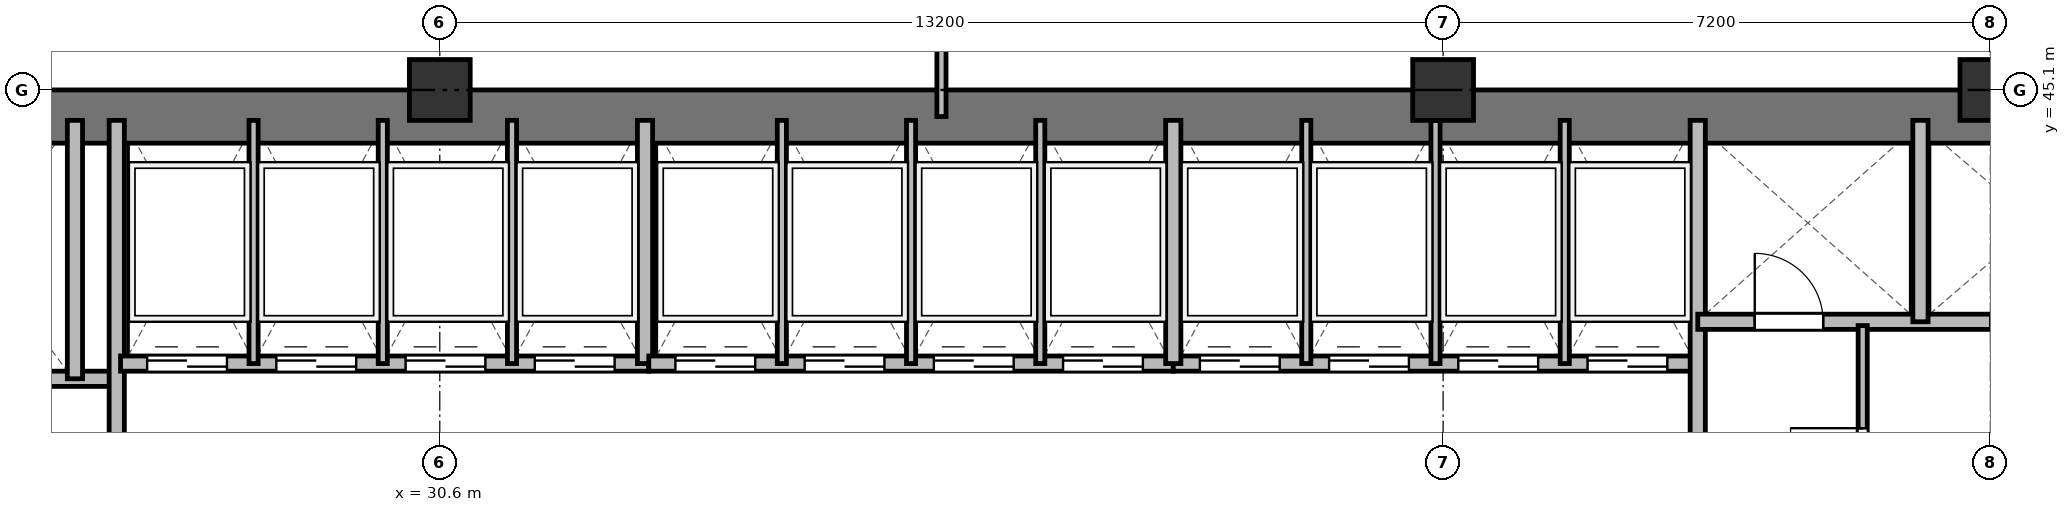
"""IFC4 building model, lengths in metres.
Left out: names, types, materials, properties, quantities, classifications, styles, units other than length and angle.
Written with IfcOpenShell. Run it as: python <this file> out.ifc"""

import sys

from ifc_helpers import new_model, si_unit, direction, frame, frame_2d, origin, origin_2d, place, context, subcontext, project, spatial, rectangle, extrude, source, transform, mapped, element, fill, save


model = new_model("IFC4")
c1 = context("Model", 3, precision=1e-05, world=origin(), true_north=direction((0.0, 1.0)))
c2 = subcontext(c1, "Body", "Model", "MODEL_VIEW")
j1 = project(units=[si_unit("LENGTHUNIT", "METRE"), si_unit("PLANEANGLEUNIT", "RADIAN")], contexts=[c1])
p1 = place(None, origin())
s1 = spatial("IfcSite", under=j1, at=p1, CompositionType="ELEMENT")
p2 = place(p1, origin())
s2 = spatial("IfcBuilding", under=s1, at=p2, CompositionType="ELEMENT")
p3 = place(p2, frame((0.0, 0.0, 128.5)))
s3 = spatial("IfcBuildingStorey", under=s2, at=p3, CompositionType="ELEMENT", Elevation=128.5)
m1 = source(origin(), c2, "Body", "SweptSolid", [
    extrude(rectangle(XDim=0.8, YDim=0.8, at=origin_2d()), origin(), (0.0, 0.0, 1.0), 3.6),
])
for number, where, z_axis, x_axis in (
    (1, (30.6, 45.1, 0.0), (0.0, 0.0, 1.0), (1.0, 0.0, 0.0)),
    (2, (43.8, 45.1, 0.0), (0.0, 0.0, 1.0), (1.0, 0.0, 0.0)),
    (3, (51.0, 45.1, 0.0), (0.0, 0.0, 1.0), (1.0, 0.0, 0.0)),
):
    element("IfcColumn", number, at=place(p3, frame(where, z_axis=z_axis, x_axis=x_axis)), inside=s3, PredefinedType="COLUMN", context=c2, shape_type="MappedRepresentation", body=[
        mapped(m1, transform((0.0, 0.0, 0.0), x_axis=(1.0, 0.0, 0.0), y_axis=(0.0, 1.0, 0.0), z_axis=(0.0, 0.0, 1.0), scale=1.0)),
    ])
p4 = place(p3, frame((15.5, 44.75, 0.0), z_axis=(0.0, 0.0, 1.0), x_axis=(1.0, 0.0, 0.0)))
e4 = element("IfcWall", 4, at=p4, inside=s3, PredefinedType="SHEAR", context=c2, shape_type="SweptSolid", body=[
    extrude(rectangle(XDim=43.4, YDim=0.7, at=frame_2d((21.7, 0.0))), origin(), (0.0, 0.0, 1.0), 3.22),
])
p5 = place(p3, frame((19.55, 41.3, 0.0), z_axis=(0.0, 0.0, 1.0), x_axis=(1.0, 0.0, 0.0)))
e5 = element("IfcWall", 5, at=p5, inside=s3, PredefinedType="SOLIDWALL", context=c2, shape_type="SweptSolid", body=[
    extrude(rectangle(XDim=6.75, YDim=0.2, at=frame_2d((3.375, 0.0))), origin(), (0.0, 0.0, 1.0), 3.22),
])
p6 = place(p5, frame((1.7, 0.0, 0.0)))
e6 = element("IfcOpeningElement", 6, at=p6, cuts=e5, PredefinedType="OPENING", context=c2, shape_type="SweptSolid", body=[
    extrude(rectangle(XDim=1.1, YDim=2.15, at=frame_2d((0.55, 1.075))), frame((0.0, 0.11, 0.0), z_axis=(0.0, -1.0, 0.0), x_axis=(1.0, 0.0, 0.0)), (0.0, 0.0, 1.0), 0.22),
])
p7 = place(p5, frame((4.4, 0.0, 0.0)))
e7 = element("IfcOpeningElement", 7, at=p7, cuts=e5, PredefinedType="OPENING", context=c2, shape_type="SweptSolid", body=[
    extrude(rectangle(XDim=1.1, YDim=2.15, at=frame_2d((0.55, 1.075))), frame((0.0, 0.11, 0.0), z_axis=(0.0, -1.0, 0.0), x_axis=(1.0, 0.0, 0.0)), (0.0, 0.0, 1.0), 0.22),
])
p8 = place(p3, frame((25.8, 41.3, 0.0), z_axis=(0.0, 0.0, 1.0), x_axis=(0.0, 1.0, 0.0)))
e8 = element("IfcWall", 8, at=p8, inside=s3, PredefinedType="SOLIDWALL", context=c2, shape_type="SweptSolid", body=[
    extrude(rectangle(XDim=3.4, YDim=0.2, at=frame_2d((1.7, 0.0))), origin(), (0.0, 0.0, 1.0), 3.22),
])
p9 = place(p3, frame((26.35, 33.4, 0.0), z_axis=(0.0, 0.0, 1.0), x_axis=(0.0, 1.0, 0.0)))
e9 = element("IfcWall", 9, at=p9, inside=s3, PredefinedType="SOLIDWALL", context=c2, shape_type="SweptSolid", body=[
    extrude(rectangle(XDim=11.3, YDim=0.2, at=frame_2d((5.65, 0.0))), origin(), (0.0, 0.0, 1.0), 2.632),
])
p10 = place(p3, frame((26.4, 41.5, 0.0), z_axis=(0.0, 0.0, 1.0), x_axis=(1.0, 0.0, 0.0)))
e10 = element("IfcWall", 10, at=p10, inside=s3, PredefinedType="SOLIDWALL", context=c2, shape_type="SweptSolid", body=[
    extrude(rectangle(XDim=6.95, YDim=0.2, at=frame_2d((3.475, 0.0))), origin(), (0.0, 0.0, 1.0), 3.22),
])
p11 = place(p10, frame((0.35, 0.0, 0.0)))
e11 = element("IfcOpeningElement", 11, at=p11, cuts=e10, PredefinedType="OPENING", context=c2, shape_type="SweptSolid", body=[
    extrude(rectangle(XDim=1.05, YDim=2.15, at=frame_2d((0.525, 1.075))), frame((0.0, 0.11, 0.0), z_axis=(0.0, -1.0, 0.0), x_axis=(1.0, 0.0, 0.0)), (0.0, 0.0, 1.0), 0.22),
])
p12 = place(p10, frame((2.05, 0.0, 0.0)))
e12 = element("IfcOpeningElement", 12, at=p12, cuts=e10, PredefinedType="OPENING", context=c2, shape_type="SweptSolid", body=[
    extrude(rectangle(XDim=1.05, YDim=2.15, at=frame_2d((0.525, 1.075))), frame((0.0, 0.11, 0.0), z_axis=(0.0, -1.0, 0.0), x_axis=(1.0, 0.0, 0.0)), (0.0, 0.0, 1.0), 0.22),
])
p13 = place(p10, frame((3.75, 0.0, 0.0)))
e13 = element("IfcOpeningElement", 13, at=p13, cuts=e10, PredefinedType="OPENING", context=c2, shape_type="SweptSolid", body=[
    extrude(rectangle(XDim=1.05, YDim=2.15, at=frame_2d((0.525, 1.075))), frame((0.0, 0.11, 0.0), z_axis=(0.0, -1.0, 0.0), x_axis=(1.0, 0.0, 0.0)), (0.0, 0.0, 1.0), 0.22),
])
p14 = place(p10, frame((5.45, 0.0, 0.0)))
e14 = element("IfcOpeningElement", 14, at=p14, cuts=e10, PredefinedType="OPENING", context=c2, shape_type="SweptSolid", body=[
    extrude(rectangle(XDim=1.05, YDim=2.15, at=frame_2d((0.525, 1.075))), frame((0.0, 0.11, 0.0), z_axis=(0.0, -1.0, 0.0), x_axis=(1.0, 0.0, 0.0)), (0.0, 0.0, 1.0), 0.22),
])
p15 = place(p3, frame((33.3, 41.5, 0.0), z_axis=(0.0, 0.0, 1.0), x_axis=(0.0, 1.0, 0.0)))
e15 = element("IfcWall", 15, at=p15, inside=s3, PredefinedType="SOLIDWALL", context=c2, shape_type="SweptSolid", body=[
    extrude(rectangle(XDim=3.2, YDim=0.2, at=frame_2d((1.6, 0.0))), origin(), (0.0, 0.0, 1.0), 3.22),
])
for number, where, z_axis, x_axis in (
    (16, (28.15, 41.5, 0.0), (0.0, 0.0, 1.0), (0.0, 1.0, 0.0)),
    (17, (29.85, 41.5, 0.0), (0.0, 0.0, 1.0), (0.0, 1.0, 0.0)),
    (18, (31.55, 41.5, 0.0), (0.0, 0.0, 1.0), (0.0, 1.0, 0.0)),
):
    element("IfcWall", number, at=place(p3, frame(where, z_axis=z_axis, x_axis=x_axis)), inside=s3, PredefinedType="PARTITIONING", context=c2, shape_type="SweptSolid", body=[
        extrude(rectangle(XDim=3.2, YDim=0.12, at=frame_2d((1.6, 0.0))), origin(), (0.0, 0.0, 1.0), 3.22),
    ])
p16 = place(p3, frame((33.35, 41.5, 0.0), z_axis=(0.0, 0.0, 1.0), x_axis=(1.0, 0.0, 0.0)))
e19 = element("IfcWall", 19, at=p16, inside=s3, PredefinedType="SOLIDWALL", context=c2, shape_type="SweptSolid", body=[
    extrude(rectangle(XDim=6.9, YDim=0.2, at=frame_2d((3.45, 0.0))), origin(), (0.0, 0.0, 1.0), 3.22),
])
p17 = place(p16, frame((0.35, 0.0, 0.0)))
e20 = element("IfcOpeningElement", 20, at=p17, cuts=e19, PredefinedType="OPENING", context=c2, shape_type="SweptSolid", body=[
    extrude(rectangle(XDim=1.05, YDim=2.15, at=frame_2d((0.525, 1.075))), frame((0.0, 0.11, 0.0), z_axis=(0.0, -1.0, 0.0), x_axis=(1.0, 0.0, 0.0)), (0.0, 0.0, 1.0), 0.22),
])
p18 = place(p16, frame((2.05, 0.0, 0.0)))
e21 = element("IfcOpeningElement", 21, at=p18, cuts=e19, PredefinedType="OPENING", context=c2, shape_type="SweptSolid", body=[
    extrude(rectangle(XDim=1.05, YDim=2.15, at=frame_2d((0.525, 1.075))), frame((0.0, 0.11, 0.0), z_axis=(0.0, -1.0, 0.0), x_axis=(1.0, 0.0, 0.0)), (0.0, 0.0, 1.0), 0.22),
])
p19 = place(p16, frame((3.75, 0.0, 0.0)))
e22 = element("IfcOpeningElement", 22, at=p19, cuts=e19, PredefinedType="OPENING", context=c2, shape_type="SweptSolid", body=[
    extrude(rectangle(XDim=1.05, YDim=2.15, at=frame_2d((0.525, 1.075))), frame((0.0, 0.11, 0.0), z_axis=(0.0, -1.0, 0.0), x_axis=(1.0, 0.0, 0.0)), (0.0, 0.0, 1.0), 0.22),
])
p20 = place(p16, frame((5.45, 0.0, 0.0)))
e23 = element("IfcOpeningElement", 23, at=p20, cuts=e19, PredefinedType="OPENING", context=c2, shape_type="SweptSolid", body=[
    extrude(rectangle(XDim=1.05, YDim=2.15, at=frame_2d((0.525, 1.075))), frame((0.0, 0.11, 0.0), z_axis=(0.0, -1.0, 0.0), x_axis=(1.0, 0.0, 0.0)), (0.0, 0.0, 1.0), 0.22),
])
for number, where, z_axis, x_axis in (
    (24, (35.1, 41.5, 0.0), (0.0, 0.0, 1.0), (0.0, 1.0, 0.0)),
    (25, (36.8, 41.5, 0.0), (0.0, 0.0, 1.0), (0.0, 1.0, 0.0)),
    (26, (38.5, 41.5, 0.0), (0.0, 0.0, 1.0), (0.0, 1.0, 0.0)),
):
    element("IfcWall", number, at=place(p3, frame(where, z_axis=z_axis, x_axis=x_axis)), inside=s3, PredefinedType="PARTITIONING", context=c2, shape_type="SweptSolid", body=[
        extrude(rectangle(XDim=3.2, YDim=0.12, at=frame_2d((1.6, 0.0))), origin(), (0.0, 0.0, 1.0), 3.22),
    ])
p21 = place(p3, frame((40.25, 41.5, 0.0), z_axis=(0.0, 0.0, 1.0), x_axis=(1.0, 0.0, 0.0)))
e27 = element("IfcWall", 27, at=p21, inside=s3, PredefinedType="SOLIDWALL", context=c2, shape_type="SweptSolid", body=[
    extrude(rectangle(XDim=6.9, YDim=0.2, at=frame_2d((3.45, 0.0))), origin(), (0.0, 0.0, 1.0), 2.72),
])
p22 = place(p21, frame((0.35, 0.0, 0.0)))
e28 = element("IfcOpeningElement", 28, at=p22, cuts=e27, PredefinedType="OPENING", context=c2, shape_type="SweptSolid", body=[
    extrude(rectangle(XDim=1.05, YDim=2.15, at=frame_2d((0.525, 1.075))), frame((0.0, 0.11, 0.0), z_axis=(0.0, -1.0, 0.0), x_axis=(1.0, 0.0, 0.0)), (0.0, 0.0, 1.0), 0.22),
])
p23 = place(p21, frame((2.05, 0.0, 0.0)))
e29 = element("IfcOpeningElement", 29, at=p23, cuts=e27, PredefinedType="OPENING", context=c2, shape_type="SweptSolid", body=[
    extrude(rectangle(XDim=1.05, YDim=2.15, at=frame_2d((0.525, 1.075))), frame((0.0, 0.11, 0.0), z_axis=(0.0, -1.0, 0.0), x_axis=(1.0, 0.0, 0.0)), (0.0, 0.0, 1.0), 0.22),
])
p24 = place(p21, frame((3.75, 0.0, 0.0)))
e30 = element("IfcOpeningElement", 30, at=p24, cuts=e27, PredefinedType="OPENING", context=c2, shape_type="SweptSolid", body=[
    extrude(rectangle(XDim=1.05, YDim=2.15, at=frame_2d((0.525, 1.075))), frame((0.0, 0.11, 0.0), z_axis=(0.0, -1.0, 0.0), x_axis=(1.0, 0.0, 0.0)), (0.0, 0.0, 1.0), 0.22),
])
p25 = place(p21, frame((5.45, 0.0, 0.0)))
e31 = element("IfcOpeningElement", 31, at=p25, cuts=e27, PredefinedType="OPENING", context=c2, shape_type="SweptSolid", body=[
    extrude(rectangle(XDim=1.05, YDim=2.15, at=frame_2d((0.525, 1.075))), frame((0.0, 0.11, 0.0), z_axis=(0.0, -1.0, 0.0), x_axis=(1.0, 0.0, 0.0)), (0.0, 0.0, 1.0), 0.22),
])
p26 = place(p3, frame((40.25, 41.5, 0.0), z_axis=(0.0, 0.0, 1.0), x_axis=(0.0, 1.0, 0.0)))
e32 = element("IfcWall", 32, at=p26, inside=s3, PredefinedType="SOLIDWALL", context=c2, shape_type="SweptSolid", body=[
    extrude(rectangle(XDim=3.2, YDim=0.2, at=frame_2d((1.6, 0.0))), origin(), (0.0, 0.0, 1.0), 3.22),
])
p27 = place(p3, frame((42.0, 41.5, 0.0), z_axis=(0.0, 0.0, 1.0), x_axis=(0.0, 1.0, 0.0)))
e33 = element("IfcWall", 33, at=p27, inside=s3, PredefinedType="PARTITIONING", context=c2, shape_type="SweptSolid", body=[
    extrude(rectangle(XDim=3.2, YDim=0.12, at=frame_2d((1.6, 0.0))), origin(), (0.0, 0.0, 1.0), 3.22),
])
p28 = place(p3, frame((43.7, 41.5, 0.0), z_axis=(0.0, 0.0, 1.0), x_axis=(0.0, 1.0, 0.0)))
e34 = element("IfcWall", 34, at=p28, inside=s3, PredefinedType="PARTITIONING", context=c2, shape_type="SweptSolid", body=[
    extrude(rectangle(XDim=3.2, YDim=0.12, at=frame_2d((1.6, 0.0))), origin(), (0.0, 0.0, 1.0), 2.72),
])
p29 = place(p3, frame((45.4, 41.5, 0.0), z_axis=(0.0, 0.0, 1.0), x_axis=(0.0, 1.0, 0.0)))
e35 = element("IfcWall", 35, at=p29, inside=s3, PredefinedType="PARTITIONING", context=c2, shape_type="SweptSolid", body=[
    extrude(rectangle(XDim=3.2, YDim=0.12, at=frame_2d((1.6, 0.0))), origin(), (0.0, 0.0, 1.0), 3.22),
])
p30 = place(p3, frame((47.15, 33.4, 0.0), z_axis=(0.0, 0.0, 1.0), x_axis=(0.0, 1.0, 0.0)))
e36 = element("IfcWall", 36, at=p30, inside=s3, PredefinedType="SOLIDWALL", context=c2, shape_type="SweptSolid", body=[
    extrude(rectangle(XDim=11.3, YDim=0.2, at=frame_2d((5.65, 0.0))), origin(), (0.0, 0.0, 1.0), 2.632),
])
p31 = place(p3, frame((47.15, 42.05, 0.0), z_axis=(0.0, 0.0, 1.0), x_axis=(1.0, 0.0, 0.0)))
e37 = element("IfcWall", 37, at=p31, inside=s3, PredefinedType="SOLIDWALL", context=c2, shape_type="SweptSolid", body=[
    extrude(rectangle(XDim=7.85, YDim=0.2, at=frame_2d((3.925, 0.0))), origin(), (0.0, 0.0, 1.0), 2.72),
])
p32 = place(p31, frame((0.75, 0.0, 0.0)))
e38 = element("IfcOpeningElement", 38, at=p32, cuts=e37, PredefinedType="OPENING", context=c2, shape_type="SweptSolid", body=[
    extrude(rectangle(XDim=0.9, YDim=2.1, at=frame_2d((0.45, 1.05))), frame((0.0, 0.11, 0.0), z_axis=(0.0, -1.0, 0.0), x_axis=(1.0, 0.0, 0.0)), (0.0, 0.0, 1.0), 0.22),
])
p33 = place(p31, frame((3.85, 0.0, 0.0)))
e39 = element("IfcOpeningElement", 39, at=p33, cuts=e37, PredefinedType="OPENING", context=c2, shape_type="SweptSolid", body=[
    extrude(rectangle(XDim=0.9, YDim=2.1, at=frame_2d((0.45, 1.05))), frame((0.0, 0.11, 0.0), z_axis=(0.0, -1.0, 0.0), x_axis=(1.0, 0.0, 0.0)), (0.0, 0.0, 1.0), 0.22),
])
p34 = place(p3, frame((50.08, 42.05, 0.0), z_axis=(0.0, 0.0, 1.0), x_axis=(0.0, 1.0, 0.0)))
e40 = element("IfcWall", 40, at=p34, inside=s3, PredefinedType="SOLIDWALL", context=c2, shape_type="SweptSolid", body=[
    extrude(rectangle(XDim=2.65, YDim=0.2, at=frame_2d((1.325, 0.0))), origin(), (0.0, 0.0, 1.0), 3.22),
])
p35 = place(p3, frame((49.32, 33.4, 0.0), z_axis=(0.0, 0.0, 1.0), x_axis=(0.0, 1.0, 0.0)))
e41 = element("IfcWall", 41, at=p35, inside=s3, PredefinedType="PARTITIONING", context=c2, shape_type="SweptSolid", body=[
    extrude(rectangle(XDim=8.6, YDim=0.12, at=frame_2d((4.3, 0.0))), origin(), (0.0, 0.0, 1.0), 2.632),
])
p36 = place(p35, frame((0.85, 0.0, 0.0)))
e42 = element("IfcOpeningElement", 42, at=p36, cuts=e41, PredefinedType="OPENING", context=c2, shape_type="SweptSolid", body=[
    extrude(rectangle(XDim=0.95, YDim=2.15, at=frame_2d((0.475, 1.075))), frame((0.0, 0.07, 0.0), z_axis=(0.0, -1.0, 0.0), x_axis=(1.0, 0.0, 0.0)), (0.0, 0.0, 1.0), 0.14),
])
p37 = place(p35, frame((3.55, 0.0, 0.0)))
e43 = element("IfcOpeningElement", 43, at=p37, cuts=e41, PredefinedType="OPENING", context=c2, shape_type="SweptSolid", body=[
    extrude(rectangle(XDim=0.95, YDim=2.15, at=frame_2d((0.475, 1.075))), frame((0.0, 0.07, 0.0), z_axis=(0.0, -1.0, 0.0), x_axis=(1.0, 0.0, 0.0)), (0.0, 0.0, 1.0), 0.14),
])
p38 = place(p35, frame((6.3, 0.0, 0.0)))
e44 = element("IfcOpeningElement", 44, at=p38, cuts=e41, PredefinedType="OPENING", context=c2, shape_type="SweptSolid", body=[
    extrude(rectangle(XDim=0.95, YDim=2.15, at=frame_2d((0.475, 1.075))), frame((0.0, 0.07, 0.0), z_axis=(0.0, -1.0, 0.0), x_axis=(1.0, 0.0, 0.0)), (0.0, 0.0, 1.0), 0.14),
])
p39 = place(p3, frame((37.2, 44.75, 0.0), z_axis=(0.0, 0.0, 1.0), x_axis=(0.0, 1.0, 0.0)))
e45 = element("IfcWall", 45, at=p39, inside=s3, PredefinedType="PARTITIONING", context=c2, shape_type="SweptSolid", body=[
    extrude(rectangle(XDim=3.61, YDim=0.12, at=frame_2d((1.805, 0.0))), origin(), (0.0, 0.0, 1.0), 2.632),
])
p40 = place(p39, frame((1.1, 0.0, 0.0)))
e46 = element("IfcOpeningElement", 46, at=p40, cuts=e45, PredefinedType="OPENING", context=c2, shape_type="SweptSolid", body=[
    extrude(rectangle(XDim=0.95, YDim=2.15, at=frame_2d((0.475, 1.075))), frame((0.0, 0.07, 0.0), z_axis=(0.0, -1.0, 0.0), x_axis=(1.0, 0.0, 0.0)), (0.0, 0.0, 1.0), 0.14),
])
m2 = source(origin(), c2, "Body", "SweptSolid", [
    extrude(rectangle(XDim=1.05, YDim=2.15, at=frame_2d((0.525, 1.075))), frame((0.0, 0.025, 0.0), z_axis=(0.0, -1.0, 0.0), x_axis=(1.0, 0.0, 0.0)), (0.0, 0.0, 1.0), 0.05),
])
p41 = place(p11, origin())
e47 = element("IfcDoor", 47, at=p41, inside=s3, OperationType="DOUBLE_DOOR_SLIDING", PredefinedType="DOOR", context=c2, shape_type="MappedRepresentation", body=[
    mapped(m2, transform((0.0, 0.0, 0.0), x_axis=(1.0, 0.0, 0.0), y_axis=(0.0, 1.0, 0.0), z_axis=(0.0, 0.0, 1.0), scale=1.0)),
])
fill(e11, e47)
p42 = place(p12, origin())
e48 = element("IfcDoor", 48, at=p42, inside=s3, OperationType="DOUBLE_DOOR_SLIDING", PredefinedType="DOOR", context=c2, shape_type="MappedRepresentation", body=[
    mapped(m2, transform((0.0, 0.0, 0.0), x_axis=(1.0, 0.0, 0.0), y_axis=(0.0, 1.0, 0.0), z_axis=(0.0, 0.0, 1.0), scale=1.0)),
])
fill(e12, e48)
p43 = place(p13, origin())
e49 = element("IfcDoor", 49, at=p43, inside=s3, OperationType="DOUBLE_DOOR_SLIDING", PredefinedType="DOOR", context=c2, shape_type="MappedRepresentation", body=[
    mapped(m2, transform((0.0, 0.0, 0.0), x_axis=(1.0, 0.0, 0.0), y_axis=(0.0, 1.0, 0.0), z_axis=(0.0, 0.0, 1.0), scale=1.0)),
])
fill(e13, e49)
p44 = place(p14, origin())
e50 = element("IfcDoor", 50, at=p44, inside=s3, OperationType="DOUBLE_DOOR_SLIDING", PredefinedType="DOOR", context=c2, shape_type="MappedRepresentation", body=[
    mapped(m2, transform((0.0, 0.0, 0.0), x_axis=(1.0, 0.0, 0.0), y_axis=(0.0, 1.0, 0.0), z_axis=(0.0, 0.0, 1.0), scale=1.0)),
])
fill(e14, e50)
p45 = place(p17, origin())
e51 = element("IfcDoor", 51, at=p45, inside=s3, OperationType="DOUBLE_DOOR_SLIDING", PredefinedType="DOOR", context=c2, shape_type="MappedRepresentation", body=[
    mapped(m2, transform((0.0, 0.0, 0.0), x_axis=(1.0, 0.0, 0.0), y_axis=(0.0, 1.0, 0.0), z_axis=(0.0, 0.0, 1.0), scale=1.0)),
])
fill(e20, e51)
p46 = place(p18, origin())
e52 = element("IfcDoor", 52, at=p46, inside=s3, OperationType="DOUBLE_DOOR_SLIDING", PredefinedType="DOOR", context=c2, shape_type="MappedRepresentation", body=[
    mapped(m2, transform((0.0, 0.0, 0.0), x_axis=(1.0, 0.0, 0.0), y_axis=(0.0, 1.0, 0.0), z_axis=(0.0, 0.0, 1.0), scale=1.0)),
])
fill(e21, e52)
p47 = place(p19, origin())
e53 = element("IfcDoor", 53, at=p47, inside=s3, OperationType="DOUBLE_DOOR_SLIDING", PredefinedType="DOOR", context=c2, shape_type="MappedRepresentation", body=[
    mapped(m2, transform((0.0, 0.0, 0.0), x_axis=(1.0, 0.0, 0.0), y_axis=(0.0, 1.0, 0.0), z_axis=(0.0, 0.0, 1.0), scale=1.0)),
])
fill(e22, e53)
p48 = place(p20, origin())
e54 = element("IfcDoor", 54, at=p48, inside=s3, OperationType="DOUBLE_DOOR_SLIDING", PredefinedType="DOOR", context=c2, shape_type="MappedRepresentation", body=[
    mapped(m2, transform((0.0, 0.0, 0.0), x_axis=(1.0, 0.0, 0.0), y_axis=(0.0, 1.0, 0.0), z_axis=(0.0, 0.0, 1.0), scale=1.0)),
])
fill(e23, e54)
p49 = place(p22, origin())
e55 = element("IfcDoor", 55, at=p49, inside=s3, OperationType="DOUBLE_DOOR_SLIDING", PredefinedType="DOOR", context=c2, shape_type="MappedRepresentation", body=[
    mapped(m2, transform((0.0, 0.0, 0.0), x_axis=(1.0, 0.0, 0.0), y_axis=(0.0, 1.0, 0.0), z_axis=(0.0, 0.0, 1.0), scale=1.0)),
])
fill(e28, e55)
p50 = place(p23, origin())
e56 = element("IfcDoor", 56, at=p50, inside=s3, OperationType="DOUBLE_DOOR_SLIDING", PredefinedType="DOOR", context=c2, shape_type="MappedRepresentation", body=[
    mapped(m2, transform((0.0, 0.0, 0.0), x_axis=(1.0, 0.0, 0.0), y_axis=(0.0, 1.0, 0.0), z_axis=(0.0, 0.0, 1.0), scale=1.0)),
])
fill(e29, e56)
p51 = place(p24, origin())
e57 = element("IfcDoor", 57, at=p51, inside=s3, OperationType="DOUBLE_DOOR_SLIDING", PredefinedType="DOOR", context=c2, shape_type="MappedRepresentation", body=[
    mapped(m2, transform((0.0, 0.0, 0.0), x_axis=(1.0, 0.0, 0.0), y_axis=(0.0, 1.0, 0.0), z_axis=(0.0, 0.0, 1.0), scale=1.0)),
])
fill(e30, e57)
p52 = place(p25, origin())
e58 = element("IfcDoor", 58, at=p52, inside=s3, OperationType="DOUBLE_DOOR_SLIDING", PredefinedType="DOOR", context=c2, shape_type="MappedRepresentation", body=[
    mapped(m2, transform((0.0, 0.0, 0.0), x_axis=(1.0, 0.0, 0.0), y_axis=(0.0, 1.0, 0.0), z_axis=(0.0, 0.0, 1.0), scale=1.0)),
])
fill(e31, e58)
m3 = source(origin(), c2, "Body", "SweptSolid", [
    extrude(rectangle(XDim=0.9, YDim=2.1, at=frame_2d((0.45, 1.05))), frame((0.0, 0.025, 0.0), z_axis=(0.0, -1.0, 0.0), x_axis=(1.0, 0.0, 0.0)), (0.0, 0.0, 1.0), 0.05),
])
p53 = place(p32, origin())
e59 = element("IfcDoor", 59, at=p53, inside=s3, OperationType="SINGLE_SWING_LEFT", PredefinedType="DOOR", context=c2, shape_type="MappedRepresentation", body=[
    mapped(m3, transform((0.0, 0.0, 0.0), x_axis=(1.0, 0.0, 0.0), y_axis=(0.0, 1.0, 0.0), z_axis=(0.0, 0.0, 1.0), scale=1.0)),
])
fill(e38, e59)
m4 = source(origin(), c2, "Body", "SweptSolid", [
    extrude(rectangle(XDim=0.95, YDim=2.15, at=frame_2d((0.475, 1.075))), frame((0.0, 0.025, 0.0), z_axis=(0.0, -1.0, 0.0), x_axis=(1.0, 0.0, 0.0)), (0.0, 0.0, 1.0), 0.05),
])
p54 = place(p38, origin())
e60 = element("IfcDoor", 60, at=p54, inside=s3, OperationType="SINGLE_SWING_RIGHT", PredefinedType="DOOR", context=c2, shape_type="MappedRepresentation", body=[
    mapped(m4, transform((0.0, 0.0, 0.0), x_axis=(1.0, 0.0, 0.0), y_axis=(0.0, 1.0, 0.0), z_axis=(0.0, 0.0, 1.0), scale=1.0)),
])
fill(e44, e60)
save(model, sys.argv[1])
